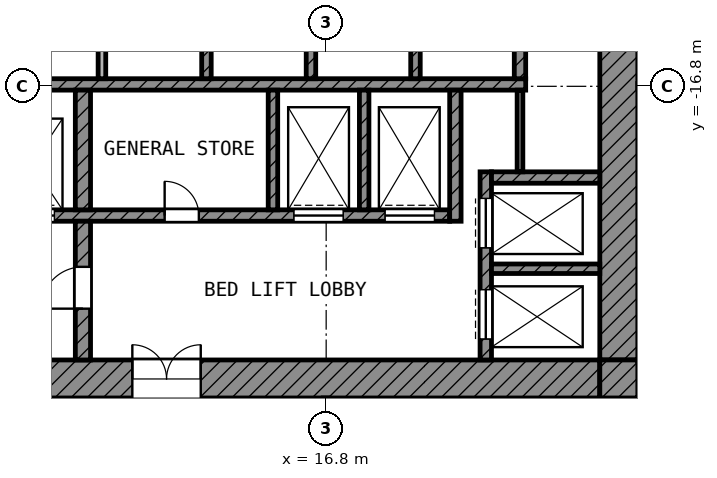
"""IFC4 building model, lengths in metres.
Left out: names, types, materials, properties, quantities, classifications, styles, units other than length and angle.
Written with IfcOpenShell. Run it as: python <this file> out.ifc"""

import sys

from ifc_helpers import new_model, si_unit, direction, frame, frame_2d, origin, place, context, subcontext, project, spatial, rectangle, extrude, element, fill, save


model = new_model("IFC4")
c1 = context("Model", 3, precision=1e-05, world=origin(), true_north=direction((0.0, 1.0)))
c2 = subcontext(c1, "Body", "Model", "MODEL_VIEW")
j1 = project(units=[si_unit("LENGTHUNIT", "METRE"), si_unit("PLANEANGLEUNIT", "RADIAN")], contexts=[c1])
p1 = place(None, origin())
s1 = spatial("IfcSite", under=j1, at=p1, CompositionType="ELEMENT")
p2 = place(p1, origin())
s2 = spatial("IfcBuilding", under=s1, at=p2, CompositionType="ELEMENT")
p3 = place(p2, frame((0.0, 0.0, 124.0)))
s3 = spatial("IfcBuildingStorey", under=s2, at=p3, CompositionType="ELEMENT", Elevation=124.0)
p4 = place(p3, frame((24.5, -24.0, 0.0), z_axis=(0.0, 0.0, 1.0), x_axis=(0.0, 1.0, 0.0)))
e1 = element("IfcWall", 1, at=p4, inside=s3, PredefinedType="SHEAR", context=c2, shape_type="SweptSolid", body=[
    extrude(rectangle(XDim=18.6, YDim=1.0, at=frame_2d((9.3, 0.0))), origin(), (0.0, 0.0, 1.0), 3.6),
])
p5 = place(p4, frame((10.5, 0.0, 0.0)))
e2 = element("IfcOpeningElement", 2, at=p5, cuts=e1, PredefinedType="OPENING", context=c2, shape_type="SweptSolid", body=[
    extrude(rectangle(XDim=1.8, YDim=2.1, at=frame_2d((0.9, 1.05))), frame((0.0, 0.51, 0.0), z_axis=(0.0, -1.0, 0.0), x_axis=(1.0, 0.0, 0.0)), (0.0, 0.0, 1.0), 1.02),
])
p6 = place(p3, frame((5.4, -24.5, 0.0), z_axis=(0.0, 0.0, 1.0), x_axis=(1.0, 0.0, 0.0)))
e3 = element("IfcWall", 3, at=p6, inside=s3, PredefinedType="SHEAR", context=c2, shape_type="SweptSolid", body=[
    extrude(rectangle(XDim=18.6, YDim=1.0, at=frame_2d((9.3, 0.0))), origin(), (0.0, 0.0, 1.0), 3.6),
])
p7 = place(p6, frame((6.3, 0.0, 0.0)))
e4 = element("IfcOpeningElement", 4, at=p7, cuts=e3, PredefinedType="OPENING", context=c2, shape_type="SweptSolid", body=[
    extrude(rectangle(XDim=1.8, YDim=2.1, at=frame_2d((0.9, 1.05))), frame((0.0, 0.51, 0.0), z_axis=(0.0, -1.0, 0.0), x_axis=(1.0, 0.0, 0.0)), (0.0, 0.0, 1.0), 1.02),
])
p8 = place(p3, frame((24.5, -25.0, 0.0), z_axis=(0.0, 0.0, 1.0), x_axis=(0.0, 1.0, 0.0)))
e5 = element("IfcWall", 5, at=p8, inside=s3, PredefinedType="SHEAR", context=c2, shape_type="SweptSolid", body=[
    extrude(rectangle(XDim=1.0, YDim=1.0, at=frame_2d((0.5, 0.0))), origin(), (0.0, 0.0, 1.0), 3.6),
])
p9 = place(p3, frame((5.4, -16.75, 0.0), z_axis=(0.0, 0.0, 1.0), x_axis=(1.0, 0.0, 0.0)))
e6 = element("IfcWall", 6, at=p9, inside=s3, PredefinedType="SHEAR", context=c2, shape_type="SweptSolid", body=[
    extrude(rectangle(XDim=16.65, YDim=0.3, at=frame_2d((8.325, 0.0))), origin(), (0.0, 0.0, 1.0), 3.6),
])
p10 = place(p3, frame((5.4, -20.2, 0.0), z_axis=(0.0, 0.0, 1.0), x_axis=(1.0, 0.0, 0.0)))
e7 = element("IfcWall", 7, at=p10, inside=s3, PredefinedType="SHEAR", context=c2, shape_type="SweptSolid", body=[
    extrude(rectangle(XDim=14.65, YDim=0.3, at=frame_2d((7.325, 0.0))), origin(), (0.0, 0.0, 1.0), 3.6),
])
p11 = place(p10, frame((10.55, 0.0, 0.0)))
e8 = element("IfcOpeningElement", 8, at=p11, cuts=e7, PredefinedType="OPENING", context=c2, shape_type="SweptSolid", body=[
    extrude(rectangle(XDim=1.3, YDim=2.1, at=frame_2d((0.65, 1.05))), frame((0.0, 0.16, 0.0), z_axis=(0.0, -1.0, 0.0), x_axis=(1.0, 0.0, 0.0)), (0.0, 0.0, 1.0), 0.32),
])
p12 = place(p10, frame((12.95, 0.0, 0.0)))
e9 = element("IfcOpeningElement", 9, at=p12, cuts=e7, PredefinedType="OPENING", context=c2, shape_type="SweptSolid", body=[
    extrude(rectangle(XDim=1.3, YDim=2.1, at=frame_2d((0.65, 1.05))), frame((0.0, 0.16, 0.0), z_axis=(0.0, -1.0, 0.0), x_axis=(1.0, 0.0, 0.0)), (0.0, 0.0, 1.0), 0.32),
])
p13 = place(p10, frame((0.55, 0.0, 0.0)))
e10 = element("IfcOpeningElement", 10, at=p13, cuts=e7, PredefinedType="OPENING", context=c2, shape_type="SweptSolid", body=[
    extrude(rectangle(XDim=1.3, YDim=2.1, at=frame_2d((0.65, 1.05))), frame((0.0, 0.16, 0.0), z_axis=(0.0, -1.0, 0.0), x_axis=(1.0, 0.0, 0.0)), (0.0, 0.0, 1.0), 0.32),
])
p14 = place(p10, frame((2.95, 0.0, 0.0)))
e11 = element("IfcOpeningElement", 11, at=p14, cuts=e7, PredefinedType="OPENING", context=c2, shape_type="SweptSolid", body=[
    extrude(rectangle(XDim=1.3, YDim=2.1, at=frame_2d((0.65, 1.05))), frame((0.0, 0.16, 0.0), z_axis=(0.0, -1.0, 0.0), x_axis=(1.0, 0.0, 0.0)), (0.0, 0.0, 1.0), 0.32),
])
p15 = place(p10, frame((7.15, 0.0, 0.0)))
e12 = element("IfcOpeningElement", 12, at=p15, cuts=e7, PredefinedType="OPENING", context=c2, shape_type="SweptSolid", body=[
    extrude(rectangle(XDim=0.9, YDim=2.1, at=frame_2d((0.45, 1.05))), frame((0.0, 0.16, 0.0), z_axis=(0.0, -1.0, 0.0), x_axis=(1.0, 0.0, 0.0)), (0.0, 0.0, 1.0), 0.32),
])
p16 = place(p3, frame((10.4, -24.0, 0.0), z_axis=(0.0, 0.0, 1.0), x_axis=(0.0, 1.0, 0.0)))
e13 = element("IfcWall", 13, at=p16, inside=s3, PredefinedType="SHEAR", context=c2, shape_type="SweptSolid", body=[
    extrude(rectangle(XDim=3.65, YDim=0.4, at=frame_2d((1.825, 0.0))), origin(), (0.0, 0.0, 1.0), 3.6),
])
p17 = place(p16, frame((1.35, 0.0, 0.0)))
e14 = element("IfcOpeningElement", 14, at=p17, cuts=e13, PredefinedType="OPENING", context=c2, shape_type="SweptSolid", body=[
    extrude(rectangle(XDim=1.1, YDim=2.1, at=frame_2d((0.55, 1.05))), frame((0.0, 0.21, 0.0), z_axis=(0.0, -1.0, 0.0), x_axis=(1.0, 0.0, 0.0)), (0.0, 0.0, 1.0), 0.42),
])
p18 = place(p3, frame((10.4, -20.05, 0.0), z_axis=(0.0, 0.0, 1.0), x_axis=(0.0, 1.0, 0.0)))
e15 = element("IfcWall", 15, at=p18, inside=s3, PredefinedType="SHEAR", context=c2, shape_type="SweptSolid", body=[
    extrude(rectangle(XDim=3.15, YDim=0.4, at=frame_2d((1.575, 0.0))), origin(), (0.0, 0.0, 1.0), 3.6),
])
p19 = place(p3, frame((20.2, -20.35, 0.0), z_axis=(0.0, 0.0, 1.0), x_axis=(0.0, 1.0, 0.0)))
e16 = element("IfcWall", 16, at=p19, inside=s3, PredefinedType="SHEAR", context=c2, shape_type="SweptSolid", body=[
    extrude(rectangle(XDim=3.45, YDim=0.3, at=frame_2d((1.725, 0.0))), origin(), (0.0, 0.0, 1.0), 3.6),
])
p20 = place(p3, frame((21.9, -16.6, 0.0), z_axis=(0.0, 0.0, 1.0), x_axis=(0.0, 1.0, 0.0)))
e17 = element("IfcWall", 17, at=p20, inside=s3, PredefinedType="SHEAR", context=c2, shape_type="SweptSolid", body=[
    extrude(rectangle(XDim=2.35, YDim=0.3, at=frame_2d((1.175, 0.0))), origin(), (0.0, 0.0, 1.0), 3.6),
])
p21 = place(p3, frame((21.15, -19.2, 0.0), z_axis=(0.0, 0.0, 1.0), x_axis=(1.0, 0.0, 0.0)))
e18 = element("IfcWall", 18, at=p21, inside=s3, PredefinedType="SHEAR", context=c2, shape_type="SweptSolid", body=[
    extrude(rectangle(XDim=2.85, YDim=0.3, at=frame_2d((1.425, 0.0))), origin(), (0.0, 0.0, 1.0), 3.6),
])
p22 = place(p3, frame((21.0, -24.0, 0.0), z_axis=(0.0, 0.0, 1.0), x_axis=(0.0, 1.0, 0.0)))
e19 = element("IfcWall", 19, at=p22, inside=s3, PredefinedType="SHEAR", context=c2, shape_type="SweptSolid", body=[
    extrude(rectangle(XDim=4.95, YDim=0.3, at=frame_2d((2.475, 0.0))), origin(), (0.0, 0.0, 1.0), 3.6),
])
p23 = place(p22, frame((2.95, 0.0, 0.0)))
e20 = element("IfcOpeningElement", 20, at=p23, cuts=e19, PredefinedType="OPENING", context=c2, shape_type="SweptSolid", body=[
    extrude(rectangle(XDim=1.3, YDim=2.1, at=frame_2d((0.65, 1.05))), frame((0.0, 0.16, 0.0), z_axis=(0.0, -1.0, 0.0), x_axis=(1.0, 0.0, 0.0)), (0.0, 0.0, 1.0), 0.32),
])
p24 = place(p22, frame((0.55, 0.0, 0.0)))
e21 = element("IfcOpeningElement", 21, at=p24, cuts=e19, PredefinedType="OPENING", context=c2, shape_type="SweptSolid", body=[
    extrude(rectangle(XDim=1.3, YDim=2.1, at=frame_2d((0.65, 1.05))), frame((0.0, 0.16, 0.0), z_axis=(0.0, -1.0, 0.0), x_axis=(1.0, 0.0, 0.0)), (0.0, 0.0, 1.0), 0.32),
])
p25 = place(p3, frame((21.15, -21.6, 0.0), z_axis=(0.0, 0.0, 1.0), x_axis=(1.0, 0.0, 0.0)))
e22 = element("IfcWall", 22, at=p25, inside=s3, PredefinedType="SHEAR", context=c2, shape_type="SweptSolid", body=[
    extrude(rectangle(XDim=2.85, YDim=0.25, at=frame_2d((1.425, 0.0))), origin(), (0.0, 0.0, 1.0), 3.6),
])
for number, where, z_axis, x_axis in (
    (23, (15.4, -20.05, 0.0), (0.0, 0.0, 1.0), (0.0, 1.0, 0.0)),
    (24, (17.8, -20.05, 0.0), (0.0, 0.0, 1.0), (0.0, 1.0, 0.0)),
):
    element("IfcWall", number, at=place(p3, frame(where, z_axis=z_axis, x_axis=x_axis)), inside=s3, PredefinedType="SHEAR", context=c2, shape_type="SweptSolid", body=[
        extrude(rectangle(XDim=3.15, YDim=0.25, at=frame_2d((1.575, 0.0))), origin(), (0.0, 0.0, 1.0), 3.6),
    ])
p26 = place(p3, frame((10.9, -16.6, 0.0), z_axis=(0.0, 0.0, 1.0), x_axis=(0.0, 1.0, 0.0)))
e25 = element("IfcWall", 25, at=p26, inside=s3, PredefinedType="PARTITIONING", context=c2, shape_type="SweptSolid", body=[
    extrude(rectangle(XDim=2.35, YDim=0.2, at=frame_2d((1.175, 0.0))), origin(), (0.0, 0.0, 1.0), 3.6),
])
for number, where, z_axis, x_axis in (
    (26, (13.65, -16.6, 0.0), (0.0, 0.0, 1.0), (0.0, 1.0, 0.0)),
    (27, (16.4, -16.6, 0.0), (0.0, 0.0, 1.0), (0.0, 1.0, 0.0)),
    (28, (19.15, -16.6, 0.0), (0.0, 0.0, 1.0), (0.0, 1.0, 0.0)),
):
    element("IfcWall", number, at=place(p3, frame(where, z_axis=z_axis, x_axis=x_axis)), inside=s3, PredefinedType="SHEAR", context=c2, shape_type="SweptSolid", body=[
        extrude(rectangle(XDim=2.35, YDim=0.25, at=frame_2d((1.175, 0.0))), origin(), (0.0, 0.0, 1.0), 3.6),
    ])
p27 = place(p3, frame((21.9, -19.05, 0.0), z_axis=(0.0, 0.0, 1.0), x_axis=(0.0, 1.0, 0.0)))
e29 = element("IfcWall", 29, at=p27, inside=s3, PredefinedType="PARTITIONING", context=c2, shape_type="SweptSolid", body=[
    extrude(rectangle(XDim=2.15, YDim=0.15, at=frame_2d((1.075, 0.0))), origin(), (0.0, 0.0, 1.0), 3.6),
])
p28 = place(p23, origin())
e30 = element("IfcDoor", 30, at=p28, inside=s3, OperationType="DOUBLE_DOOR_SLIDING", PredefinedType="DOOR", context=c2, shape_type="SweptSolid", body=[
    extrude(rectangle(XDim=1.3, YDim=2.1, at=frame_2d((0.65, 1.05))), frame((0.0, 0.025, 0.0), z_axis=(0.0, -1.0, 0.0), x_axis=(1.0, 0.0, 0.0)), (0.0, 0.0, 1.0), 0.05),
])
fill(e20, e30)
p29 = place(p24, origin())
e31 = element("IfcDoor", 31, at=p29, inside=s3, OperationType="DOUBLE_DOOR_SLIDING", PredefinedType="DOOR", context=c2, shape_type="SweptSolid", body=[
    extrude(rectangle(XDim=1.3, YDim=2.1, at=frame_2d((0.65, 1.05))), frame((0.0, 0.025, 0.0), z_axis=(0.0, -1.0, 0.0), x_axis=(1.0, 0.0, 0.0)), (0.0, 0.0, 1.0), 0.05),
])
fill(e21, e31)
p30 = place(p11, origin())
e32 = element("IfcDoor", 32, at=p30, inside=s3, OperationType="DOUBLE_DOOR_SLIDING", PredefinedType="DOOR", context=c2, shape_type="SweptSolid", body=[
    extrude(rectangle(XDim=1.3, YDim=2.1, at=frame_2d((0.65, 1.05))), frame((0.0, 0.025, 0.0), z_axis=(0.0, -1.0, 0.0), x_axis=(1.0, 0.0, 0.0)), (0.0, 0.0, 1.0), 0.05),
])
fill(e8, e32)
p31 = place(p12, origin())
e33 = element("IfcDoor", 33, at=p31, inside=s3, OperationType="DOUBLE_DOOR_SLIDING", PredefinedType="DOOR", context=c2, shape_type="SweptSolid", body=[
    extrude(rectangle(XDim=1.3, YDim=2.1, at=frame_2d((0.65, 1.05))), frame((0.0, 0.025, 0.0), z_axis=(0.0, -1.0, 0.0), x_axis=(1.0, 0.0, 0.0)), (0.0, 0.0, 1.0), 0.05),
])
fill(e9, e33)
p32 = place(p14, origin())
e34 = element("IfcDoor", 34, at=p32, inside=s3, OperationType="DOUBLE_DOOR_SLIDING", PredefinedType="DOOR", context=c2, shape_type="SweptSolid", body=[
    extrude(rectangle(XDim=1.3, YDim=2.1, at=frame_2d((0.65, 1.05))), frame((0.0, 0.025, 0.0), z_axis=(0.0, -1.0, 0.0), x_axis=(1.0, 0.0, 0.0)), (0.0, 0.0, 1.0), 0.05),
])
fill(e11, e34)
p33 = place(p17, origin())
e35 = element("IfcDoor", 35, at=p33, inside=s3, OperationType="SINGLE_SWING_LEFT", PredefinedType="DOOR", context=c2, shape_type="SweptSolid", body=[
    extrude(rectangle(XDim=1.1, YDim=2.1, at=frame_2d((0.55, 1.05))), frame((0.0, 0.025, 0.0), z_axis=(0.0, -1.0, 0.0), x_axis=(1.0, 0.0, 0.0)), (0.0, 0.0, 1.0), 0.05),
])
fill(e14, e35)
p34 = place(p7, origin())
e36 = element("IfcDoor", 36, at=p34, inside=s3, OperationType="DOUBLE_DOOR_SINGLE_SWING", PredefinedType="DOOR", context=c2, shape_type="SweptSolid", body=[
    extrude(rectangle(XDim=1.8, YDim=2.1, at=frame_2d((0.9, 1.05))), frame((0.0, 0.025, 0.0), z_axis=(0.0, -1.0, 0.0), x_axis=(1.0, 0.0, 0.0)), (0.0, 0.0, 1.0), 0.05),
])
fill(e4, e36)
p35 = place(p15, origin())
e37 = element("IfcDoor", 37, at=p35, inside=s3, OperationType="SINGLE_SWING_LEFT", PredefinedType="DOOR", context=c2, shape_type="SweptSolid", body=[
    extrude(rectangle(XDim=0.9, YDim=2.1, at=frame_2d((0.45, 1.05))), frame((0.0, 0.025, 0.0), z_axis=(0.0, -1.0, 0.0), x_axis=(1.0, 0.0, 0.0)), (0.0, 0.0, 1.0), 0.05),
])
fill(e12, e37)
save(model, sys.argv[1])
